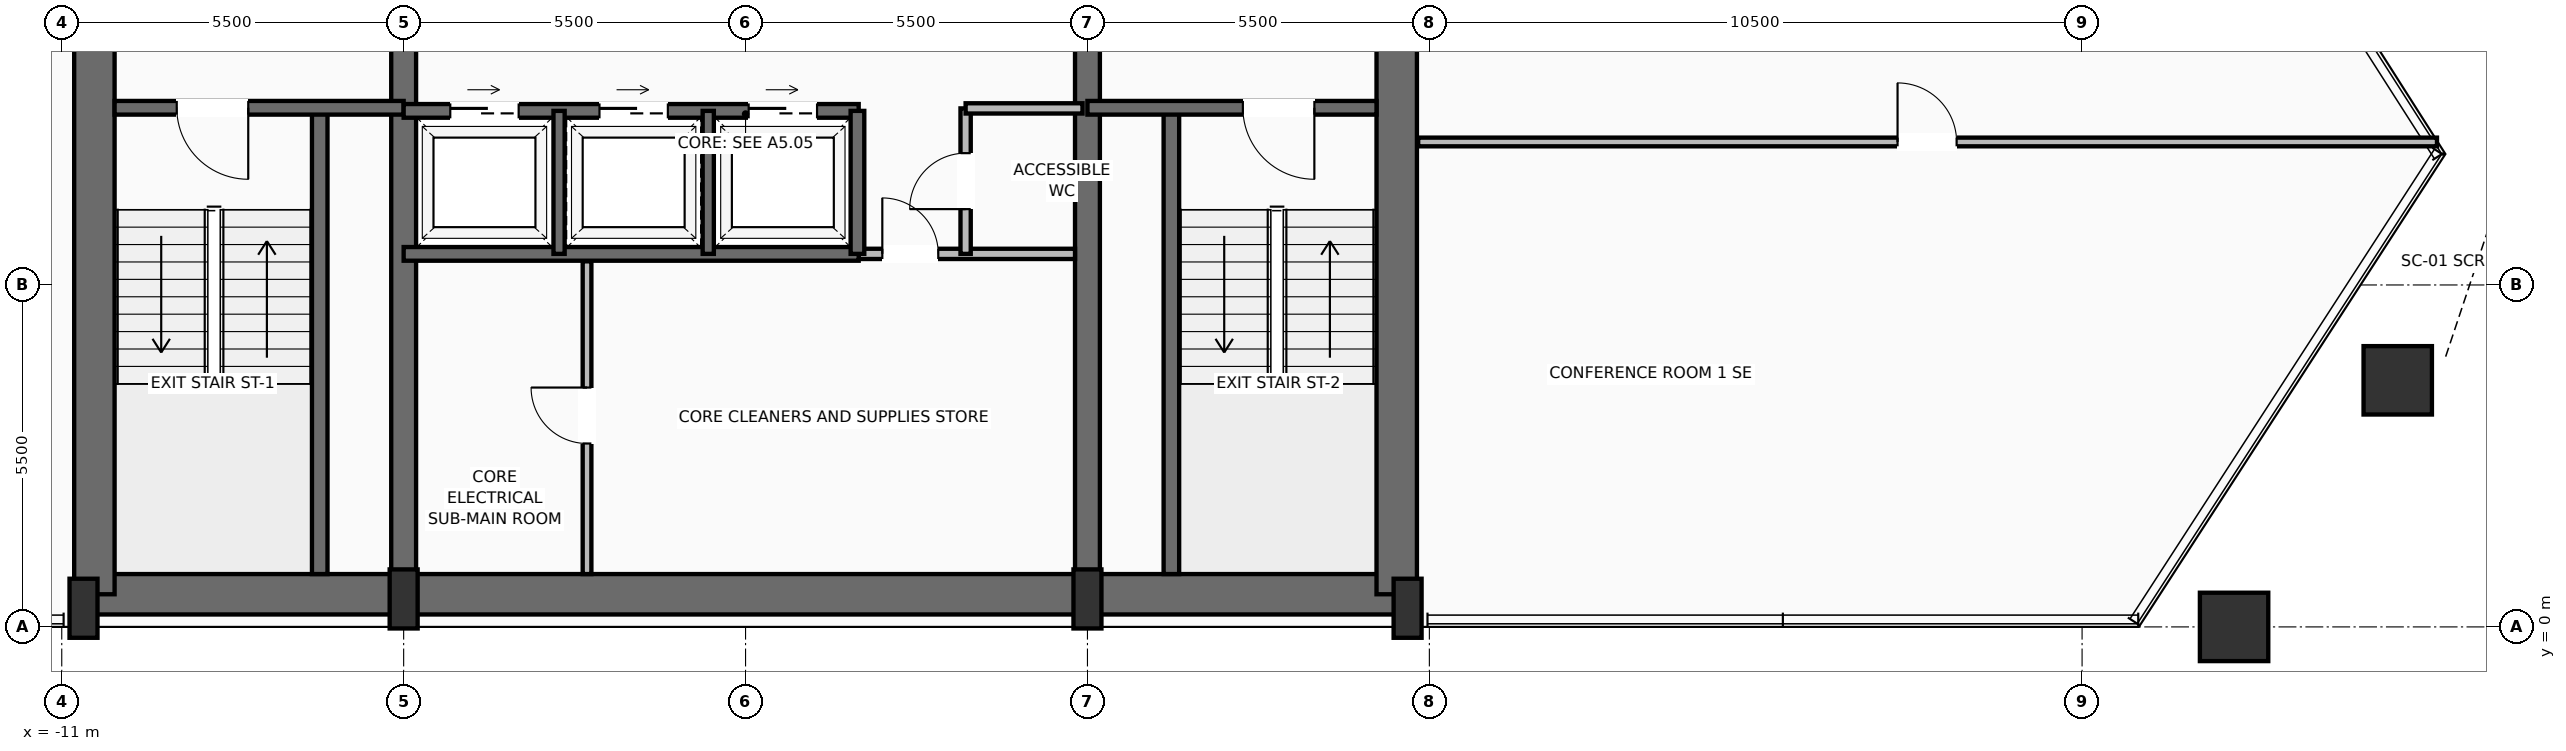
"""IFC4 building model, lengths in metres.
Left out: names, types, materials, properties, quantities, classifications, styles, units other than length and angle.
Written with IfcOpenShell. Run it as: python <this file> out.ifc"""

import sys

from ifc_helpers import new_model, si_unit, direction, frame, frame_2d, origin, origin_2d, place, context, subcontext, project, spatial, rectangle, hollow_rectangle, extrude, source, transform, mapped, element, fill, save


model = new_model("IFC4")
c1 = context("Model", 3, precision=1e-05, world=origin(), true_north=direction((0.0, 1.0)))
c2 = subcontext(c1, "Body", "Model", "MODEL_VIEW")
j1 = project(units=[si_unit("LENGTHUNIT", "METRE"), si_unit("PLANEANGLEUNIT", "RADIAN")], contexts=[c1])
p1 = place(None, origin())
s1 = spatial("IfcSite", under=j1, at=p1, CompositionType="ELEMENT")
p2 = place(p1, origin())
s2 = spatial("IfcBuilding", under=s1, at=p2, CompositionType="ELEMENT")
p3 = place(p2, frame((0.0, 0.0, 144.1)))
s3 = spatial("IfcBuildingStorey", under=s2, at=p3, CompositionType="ELEMENT", Elevation=144.1)
p4 = place(p3, frame((-10.65, 0.525, 0.0), z_axis=(0.0, 0.0, 1.0), x_axis=(1.0, 0.0, 0.0)))
e1 = element("IfcWall", 1, at=p4, inside=s3, PredefinedType="SHEAR", context=c2, shape_type="SweptSolid", body=[
    extrude(rectangle(XDim=21.3, YDim=0.65, at=frame_2d((10.65, 0.0))), origin(), (0.0, 0.0, 1.0), 3.47),
])
for number, where, z_axis, x_axis in (
    (2, (-10.475, 0.525, 0.0), (0.0, 0.0, 1.0), (0.0, 1.0, 0.0)),
    (3, (10.475, 0.525, 0.0), (0.0, 0.0, 1.0), (0.0, 1.0, 0.0)),
):
    element("IfcWall", number, at=place(p3, frame(where, z_axis=z_axis, x_axis=x_axis)), inside=s3, PredefinedType="SHEAR", context=c2, shape_type="SweptSolid", body=[
        extrude(rectangle(XDim=15.55, YDim=0.65, at=frame_2d((7.775, 0.0))), origin(), (0.0, 0.0, 1.0), 3.47),
    ])
p5 = place(p3, frame((-5.5, 0.525, 0.0), z_axis=(0.0, 0.0, 1.0), x_axis=(0.0, 1.0, 0.0)))
e4 = element("IfcWall", 4, at=p5, inside=s3, PredefinedType="SHEAR", context=c2, shape_type="SweptSolid", body=[
    extrude(rectangle(XDim=15.55, YDim=0.4, at=frame_2d((7.775, 0.0))), origin(), (0.0, 0.0, 1.0), 3.47),
])
p6 = place(p5, frame((8.975, 0.0, 0.0)))
e5 = element("IfcOpeningElement", 5, at=p6, cuts=e4, PredefinedType="OPENING", context=c2, shape_type="SweptSolid", body=[
    extrude(rectangle(XDim=1.1, YDim=2.2, at=frame_2d((0.55, 1.1))), frame((0.0, 0.21, 0.0), z_axis=(0.0, -1.0, 0.0), x_axis=(1.0, 0.0, 0.0)), (0.0, 0.0, 1.0), 0.42),
])
p7 = place(p3, frame((5.5, 0.525, 0.0), z_axis=(0.0, 0.0, 1.0), x_axis=(0.0, 1.0, 0.0)))
e6 = element("IfcWall", 6, at=p7, inside=s3, PredefinedType="SHEAR", context=c2, shape_type="SweptSolid", body=[
    extrude(rectangle(XDim=15.55, YDim=0.4, at=frame_2d((7.775, 0.0))), origin(), (0.0, 0.0, 1.0), 3.47),
])
p8 = place(p7, frame((8.975, 0.0, 0.0)))
e7 = element("IfcOpeningElement", 7, at=p8, cuts=e6, PredefinedType="OPENING", context=c2, shape_type="SweptSolid", body=[
    extrude(rectangle(XDim=1.1, YDim=2.2, at=frame_2d((0.55, 1.1))), frame((0.0, 0.21, 0.0), z_axis=(0.0, -1.0, 0.0), x_axis=(1.0, 0.0, 0.0)), (0.0, 0.0, 1.0), 0.42),
])
m1 = source(origin(), c2, "Body", "SweptSolid", [
    extrude(rectangle(XDim=0.45, YDim=0.95, at=origin_2d()), origin(), (0.0, 0.0, 1.0), 3.7),
])
for number, where, z_axis, x_axis in (
    (8, (-10.65, 0.3, 0.0), (0.0, 0.0, 1.0), (1.0, 0.0, 0.0)),
    (9, (-5.5, 0.45, 0.0), (0.0, 0.0, 1.0), (1.0, 0.0, 0.0)),
    (10, (5.5, 0.45, 0.0), (0.0, 0.0, 1.0), (1.0, 0.0, 0.0)),
    (11, (10.65, 0.3, 0.0), (0.0, 0.0, 1.0), (1.0, 0.0, 0.0)),
):
    element("IfcColumn", number, at=place(p3, frame(where, z_axis=z_axis, x_axis=x_axis)), inside=s3, PredefinedType="PILASTER", context=c2, shape_type="MappedRepresentation", body=[
        mapped(m1, transform((0.0, 0.0, 0.0), scale=1.0)),
    ])
m2 = source(origin(), c2, "Body", "SweptSolid", [
    extrude(hollow_rectangle(XDim=1.1, YDim=1.1, WallThickness=0.055, at=origin_2d()), origin(), (0.0, 0.0, 1.0), 3.691),
])
p9 = place(p3, frame((23.945, 0.0, 0.004), z_axis=(0.008465865003, 0.0, 0.999964163923), x_axis=(0.0, 1.0, 0.0)))
e12 = element("IfcColumn", 12, at=p9, inside=s3, PredefinedType="COLUMN", context=c2, shape_type="MappedRepresentation", body=[
    mapped(m2, transform((0.0, 0.0, 0.0), scale=1.0)),
])
m3 = source(origin(), c2, "Body", "SweptSolid", [
    extrude(hollow_rectangle(XDim=1.1, YDim=1.1, WallThickness=0.055, at=origin_2d()), origin(), (0.0, 0.0, 1.0), 3.692),
])
p10 = place(p3, frame((26.578, 3.966, 0.004), z_axis=(-0.004100287285, -0.015276876819, 0.999874894514), x_axis=(0.965817310186, -0.259223693643, 0.0)))
e13 = element("IfcColumn", 13, at=p10, inside=s3, PredefinedType="COLUMN", context=c2, shape_type="MappedRepresentation", body=[
    mapped(m3, transform((0.0, 0.0, 0.0), scale=1.0)),
])
p11 = place(p3, frame((-6.85, 0.85, 0.0), z_axis=(0.0, 0.0, 1.0), x_axis=(0.0, 1.0, 0.0)))
e14 = element("IfcWall", 14, at=p11, inside=s3, PredefinedType="SOLIDWALL", context=c2, shape_type="SweptSolid", body=[
    extrude(rectangle(XDim=7.5, YDim=0.25, at=frame_2d((3.75, 0.0))), origin(), (0.0, 0.0, 1.0), 3.47),
])
p12 = place(p3, frame((-5.5, 8.35, 0.0), z_axis=(0.0, 0.0, 1.0), x_axis=(-1.0, 0.0, 0.0)))
e15 = element("IfcWall", 15, at=p12, inside=s3, PredefinedType="SOLIDWALL", context=c2, shape_type="SweptSolid", body=[
    extrude(rectangle(XDim=4.65, YDim=0.22, at=frame_2d((2.325, 0.0))), origin(), (0.0, 0.0, 1.0), 3.47),
])
p13 = place(p12, frame((2.5, 0.0, 0.0)))
e16 = element("IfcOpeningElement", 16, at=p13, cuts=e15, PredefinedType="OPENING", context=c2, shape_type="SweptSolid", body=[
    extrude(rectangle(XDim=1.15, YDim=2.2, at=frame_2d((0.575, 1.1))), frame((0.0, 0.12, 0.0), z_axis=(0.0, -1.0, 0.0), x_axis=(1.0, 0.0, 0.0)), (0.0, 0.0, 1.0), 0.24),
])
p14 = place(p3, frame((6.85, 0.85, 0.0), z_axis=(0.0, 0.0, 1.0), x_axis=(0.0, 1.0, 0.0)))
e17 = element("IfcWall", 17, at=p14, inside=s3, PredefinedType="SOLIDWALL", context=c2, shape_type="SweptSolid", body=[
    extrude(rectangle(XDim=7.5, YDim=0.25, at=frame_2d((3.75, 0.0))), origin(), (0.0, 0.0, 1.0), 3.47),
])
p15 = place(p3, frame((10.15, 8.35, 0.0), z_axis=(0.0, 0.0, 1.0), x_axis=(-1.0, 0.0, 0.0)))
e18 = element("IfcWall", 18, at=p15, inside=s3, PredefinedType="SOLIDWALL", context=c2, shape_type="SweptSolid", body=[
    extrude(rectangle(XDim=4.65, YDim=0.22, at=frame_2d((2.325, 0.0))), origin(), (0.0, 0.0, 1.0), 3.47),
])
p16 = place(p15, frame((1.0, 0.0, 0.0)))
e19 = element("IfcOpeningElement", 19, at=p16, cuts=e18, PredefinedType="OPENING", context=c2, shape_type="SweptSolid", body=[
    extrude(rectangle(XDim=1.15, YDim=2.2, at=frame_2d((0.575, 1.1))), frame((0.0, 0.12, 0.0), z_axis=(0.0, -1.0, 0.0), x_axis=(1.0, 0.0, 0.0)), (0.0, 0.0, 1.0), 0.24),
])
p17 = place(p3, frame((1.82, 6.0, 0.0), z_axis=(0.0, 0.0, 1.0), x_axis=(1.0, 0.0, 0.0)))
e20 = element("IfcWall", 20, at=p17, inside=s3, PredefinedType="PARTITIONING", context=c2, shape_type="SweptSolid", body=[
    extrude(rectangle(XDim=3.48, YDim=0.165, at=frame_2d((1.74, 0.0))), origin(), (0.0, 0.0, 1.0), 3.462),
])
p18 = place(p17, frame((0.38, 0.0, 0.0)))
e21 = element("IfcOpeningElement", 21, at=p18, cuts=e20, PredefinedType="OPENING", context=c2, shape_type="SweptSolid", body=[
    extrude(rectangle(XDim=0.9, YDim=2.1, at=frame_2d((0.45, 1.05))), frame((0.0, 0.093, 0.0), z_axis=(0.0, -1.0, 0.0), x_axis=(1.0, 0.0, 0.0)), (0.0, 0.0, 1.0), 0.185),
])
p19 = place(p3, frame((-2.55, 0.85, 0.0), z_axis=(0.0, 0.0, 1.0), x_axis=(0.0, 1.0, 0.0)))
e22 = element("IfcWall", 22, at=p19, inside=s3, PredefinedType="PARTITIONING", context=c2, shape_type="SweptSolid", body=[
    extrude(rectangle(XDim=5.03, YDim=0.14, at=frame_2d((2.515, 0.0))), origin(), (0.0, 0.0, 1.0), 3.462),
])
p20 = place(p19, frame((2.1, 0.0, 0.0)))
e23 = element("IfcOpeningElement", 23, at=p20, cuts=e22, PredefinedType="OPENING", context=c2, shape_type="SweptSolid", body=[
    extrude(rectangle(XDim=0.9, YDim=2.1, at=frame_2d((0.45, 1.05))), frame((0.0, 0.08, 0.0), z_axis=(0.0, -1.0, 0.0), x_axis=(1.0, 0.0, 0.0)), (0.0, 0.0, 1.0), 0.16),
])
p21 = place(p3, frame((3.54, 6.0, 0.0), z_axis=(0.0, 0.0, 1.0), x_axis=(0.0, 1.0, 0.0)))
e24 = element("IfcWall", 24, at=p21, inside=s3, PredefinedType="PARTITIONING", context=c2, shape_type="SweptSolid", body=[
    extrude(rectangle(XDim=2.34, YDim=0.165, at=frame_2d((1.17, 0.0))), origin(), (0.0, 0.0, 1.0), 3.462),
])
p22 = place(p21, frame((0.72, 0.0, 0.0)))
e25 = element("IfcOpeningElement", 25, at=p22, cuts=e24, PredefinedType="OPENING", context=c2, shape_type="SweptSolid", body=[
    extrude(rectangle(XDim=0.9, YDim=2.1, at=frame_2d((0.45, 1.05))), frame((0.0, 0.093, 0.0), z_axis=(0.0, -1.0, 0.0), x_axis=(1.0, 0.0, 0.0)), (0.0, 0.0, 1.0), 0.185),
])
p23 = place(p3, frame((3.54, 8.34, 0.0), z_axis=(0.0, 0.0, 1.0), x_axis=(1.0, 0.0, 0.0)))
e26 = element("IfcWall", 26, at=p23, inside=s3, PredefinedType="PARTITIONING", context=c2, shape_type="SweptSolid", body=[
    extrude(rectangle(XDim=1.88, YDim=0.165, at=frame_2d((0.94, 0.0))), origin(), (0.0, 0.0, 1.0), 3.462),
])
p24 = place(p3, frame((-5.5, 6.0, 0.0), z_axis=(0.0, 0.0, 1.0), x_axis=(1.0, 0.0, 0.0)))
e27 = element("IfcWall", 27, at=p24, inside=s3, PredefinedType="SOLIDWALL", context=c2, shape_type="SweptSolid", body=[
    extrude(rectangle(XDim=7.32, YDim=0.22, at=frame_2d((3.66, 0.0))), origin(), (0.0, 0.0, 1.0), 3.47),
])
p25 = place(p3, frame((-5.5, 8.3, 0.0), z_axis=(0.0, 0.0, 1.0), x_axis=(1.0, 0.0, 0.0)))
e28 = element("IfcWall", 28, at=p25, inside=s3, PredefinedType="SOLIDWALL", context=c2, shape_type="SweptSolid", body=[
    extrude(rectangle(XDim=7.32, YDim=0.22, at=frame_2d((3.66, 0.0))), origin(), (0.0, 0.0, 1.0), 3.47),
])
p26 = place(p25, frame((0.75, 0.0, 0.0)))
e29 = element("IfcOpeningElement", 29, at=p26, cuts=e28, PredefinedType="OPENING", context=c2, shape_type="SweptSolid", body=[
    extrude(rectangle(XDim=1.1, YDim=2.2, at=frame_2d((0.55, 1.1))), frame((0.0, 0.12, 0.0), z_axis=(0.0, -1.0, 0.0), x_axis=(1.0, 0.0, 0.0)), (0.0, 0.0, 1.0), 0.24),
])
p27 = place(p25, frame((3.15, 0.0, 0.0)))
e30 = element("IfcOpeningElement", 30, at=p27, cuts=e28, PredefinedType="OPENING", context=c2, shape_type="SweptSolid", body=[
    extrude(rectangle(XDim=1.1, YDim=2.2, at=frame_2d((0.55, 1.1))), frame((0.0, 0.12, 0.0), z_axis=(0.0, -1.0, 0.0), x_axis=(1.0, 0.0, 0.0)), (0.0, 0.0, 1.0), 0.24),
])
p28 = place(p25, frame((5.55, 0.0, 0.0)))
e31 = element("IfcOpeningElement", 31, at=p28, cuts=e28, PredefinedType="OPENING", context=c2, shape_type="SweptSolid", body=[
    extrude(rectangle(XDim=1.1, YDim=2.2, at=frame_2d((0.55, 1.1))), frame((0.0, 0.12, 0.0), z_axis=(0.0, -1.0, 0.0), x_axis=(1.0, 0.0, 0.0)), (0.0, 0.0, 1.0), 0.24),
])
p29 = place(p3, frame((1.8, 6.0, 0.0), z_axis=(0.0, 0.0, 1.0), x_axis=(0.0, 1.0, 0.0)))
e32 = element("IfcWall", 32, at=p29, inside=s3, PredefinedType="SOLIDWALL", context=c2, shape_type="SweptSolid", body=[
    extrude(rectangle(XDim=2.3, YDim=0.22, at=frame_2d((1.15, 0.0))), origin(), (0.0, 0.0, 1.0), 3.47),
])
for number, where, z_axis, x_axis in (
    (33, (-3.0, 6.0, 0.0), (0.0, 0.0, 1.0), (0.0, 1.0, 0.0)),
    (34, (-0.6, 6.0, 0.0), (0.0, 0.0, 1.0), (0.0, 1.0, 0.0)),
):
    element("IfcWall", number, at=place(p3, frame(where, z_axis=z_axis, x_axis=x_axis)), inside=s3, PredefinedType="SOLIDWALL", context=c2, shape_type="SweptSolid", body=[
        extrude(rectangle(XDim=2.3, YDim=0.18, at=frame_2d((1.15, 0.0))), origin(), (0.0, 0.0, 1.0), 3.47),
    ])
p30 = place(p3, frame((10.82, 7.8, 0.0), z_axis=(0.0, 0.0, 1.0), x_axis=(1.0, 0.0, 0.0)))
e35 = element("IfcWall", 35, at=p30, inside=s3, PredefinedType="PARTITIONING", context=c2, shape_type="SweptSolid", body=[
    extrude(rectangle(XDim=16.389, YDim=0.14, at=frame_2d((8.194, 0.0))), origin(), (0.0, 0.0, 1.0), 3.462),
])
p31 = place(p30, frame((7.712, 0.0, 0.0)))
e36 = element("IfcOpeningElement", 36, at=p31, cuts=e35, PredefinedType="OPENING", context=c2, shape_type="SweptSolid", body=[
    extrude(rectangle(XDim=0.95, YDim=2.2, at=frame_2d((0.475, 1.1))), frame((0.0, 0.08, 0.0), z_axis=(0.0, -1.0, 0.0), x_axis=(1.0, 0.0, 0.0)), (0.0, 0.0, 1.0), 0.16),
])
m4 = source(origin(), c2, "Body", "SweptSolid", [
    extrude(rectangle(XDim=1.15, YDim=2.2, at=frame_2d((0.575, 1.1))), frame((0.0, 0.025, 0.0), z_axis=(0.0, -1.0, 0.0), x_axis=(1.0, 0.0, 0.0)), (0.0, 0.0, 1.0), 0.05),
])
p32 = place(p13, origin())
e37 = element("IfcDoor", 37, at=p32, inside=s3, OperationType="SINGLE_SWING_LEFT", PredefinedType="DOOR", context=c2, shape_type="MappedRepresentation", body=[
    mapped(m4, transform((0.0, 0.0, 0.0), scale=1.0)),
])
fill(e16, e37)
p33 = place(p16, origin())
e38 = element("IfcDoor", 38, at=p33, inside=s3, OperationType="SINGLE_SWING_LEFT", PredefinedType="DOOR", context=c2, shape_type="MappedRepresentation", body=[
    mapped(m4, transform((0.0, 0.0, 0.0), scale=1.0)),
])
fill(e19, e38)
m5 = source(origin(), c2, "Body", "SweptSolid", [
    extrude(rectangle(XDim=0.9, YDim=2.1, at=frame_2d((0.45, 1.05))), frame((0.0, 0.025, 0.0), z_axis=(0.0, -1.0, 0.0), x_axis=(1.0, 0.0, 0.0)), (0.0, 0.0, 1.0), 0.05),
])
p34 = place(p18, origin())
e39 = element("IfcDoor", 39, at=p34, inside=s3, OperationType="SINGLE_SWING_LEFT", PredefinedType="DOOR", context=c2, shape_type="MappedRepresentation", body=[
    mapped(m5, transform((0.0, 0.0, 0.0), scale=1.0)),
])
fill(e21, e39)
p35 = place(p20, origin())
e40 = element("IfcDoor", 40, at=p35, inside=s3, OperationType="SINGLE_SWING_RIGHT", PredefinedType="DOOR", context=c2, shape_type="MappedRepresentation", body=[
    mapped(m5, transform((0.0, 0.0, 0.0), scale=1.0)),
])
fill(e23, e40)
p36 = place(p22, origin())
e41 = element("IfcDoor", 41, at=p36, inside=s3, OperationType="SINGLE_SWING_LEFT", PredefinedType="DOOR", context=c2, shape_type="MappedRepresentation", body=[
    mapped(m5, transform((0.0, 0.0, 0.0), scale=1.0)),
])
fill(e25, e41)
m6 = source(origin(), c2, "Body", "SweptSolid", [
    extrude(rectangle(XDim=1.1, YDim=2.2, at=frame_2d((0.55, 1.1))), frame((0.0, 0.025, 0.0), z_axis=(0.0, -1.0, 0.0), x_axis=(1.0, 0.0, 0.0)), (0.0, 0.0, 1.0), 0.05),
])
p37 = place(p26, origin())
e42 = element("IfcDoor", 42, at=p37, inside=s3, OperationType="SLIDING_TO_LEFT", PredefinedType="DOOR", context=c2, shape_type="MappedRepresentation", body=[
    mapped(m6, transform((0.0, 0.0, 0.0), scale=1.0)),
])
fill(e29, e42)
p38 = place(p27, origin())
e43 = element("IfcDoor", 43, at=p38, inside=s3, OperationType="SLIDING_TO_LEFT", PredefinedType="DOOR", context=c2, shape_type="MappedRepresentation", body=[
    mapped(m6, transform((0.0, 0.0, 0.0), scale=1.0)),
])
fill(e30, e43)
p39 = place(p28, origin())
e44 = element("IfcDoor", 44, at=p39, inside=s3, OperationType="SLIDING_TO_LEFT", PredefinedType="DOOR", context=c2, shape_type="MappedRepresentation", body=[
    mapped(m6, transform((0.0, 0.0, 0.0), scale=1.0)),
])
fill(e31, e44)
m7 = source(origin(), c2, "Body", "SweptSolid", [
    extrude(rectangle(XDim=0.95, YDim=2.2, at=frame_2d((0.475, 1.1))), frame((0.0, 0.025, 0.0), z_axis=(0.0, -1.0, 0.0), x_axis=(1.0, 0.0, 0.0)), (0.0, 0.0, 1.0), 0.05),
])
p40 = place(p31, origin())
e45 = element("IfcDoor", 45, at=p40, inside=s3, OperationType="SINGLE_SWING_LEFT", PredefinedType="DOOR", context=c2, shape_type="MappedRepresentation", body=[
    mapped(m7, transform((0.0, 0.0, 0.0), scale=1.0)),
])
fill(e36, e45)
save(model, sys.argv[1])
